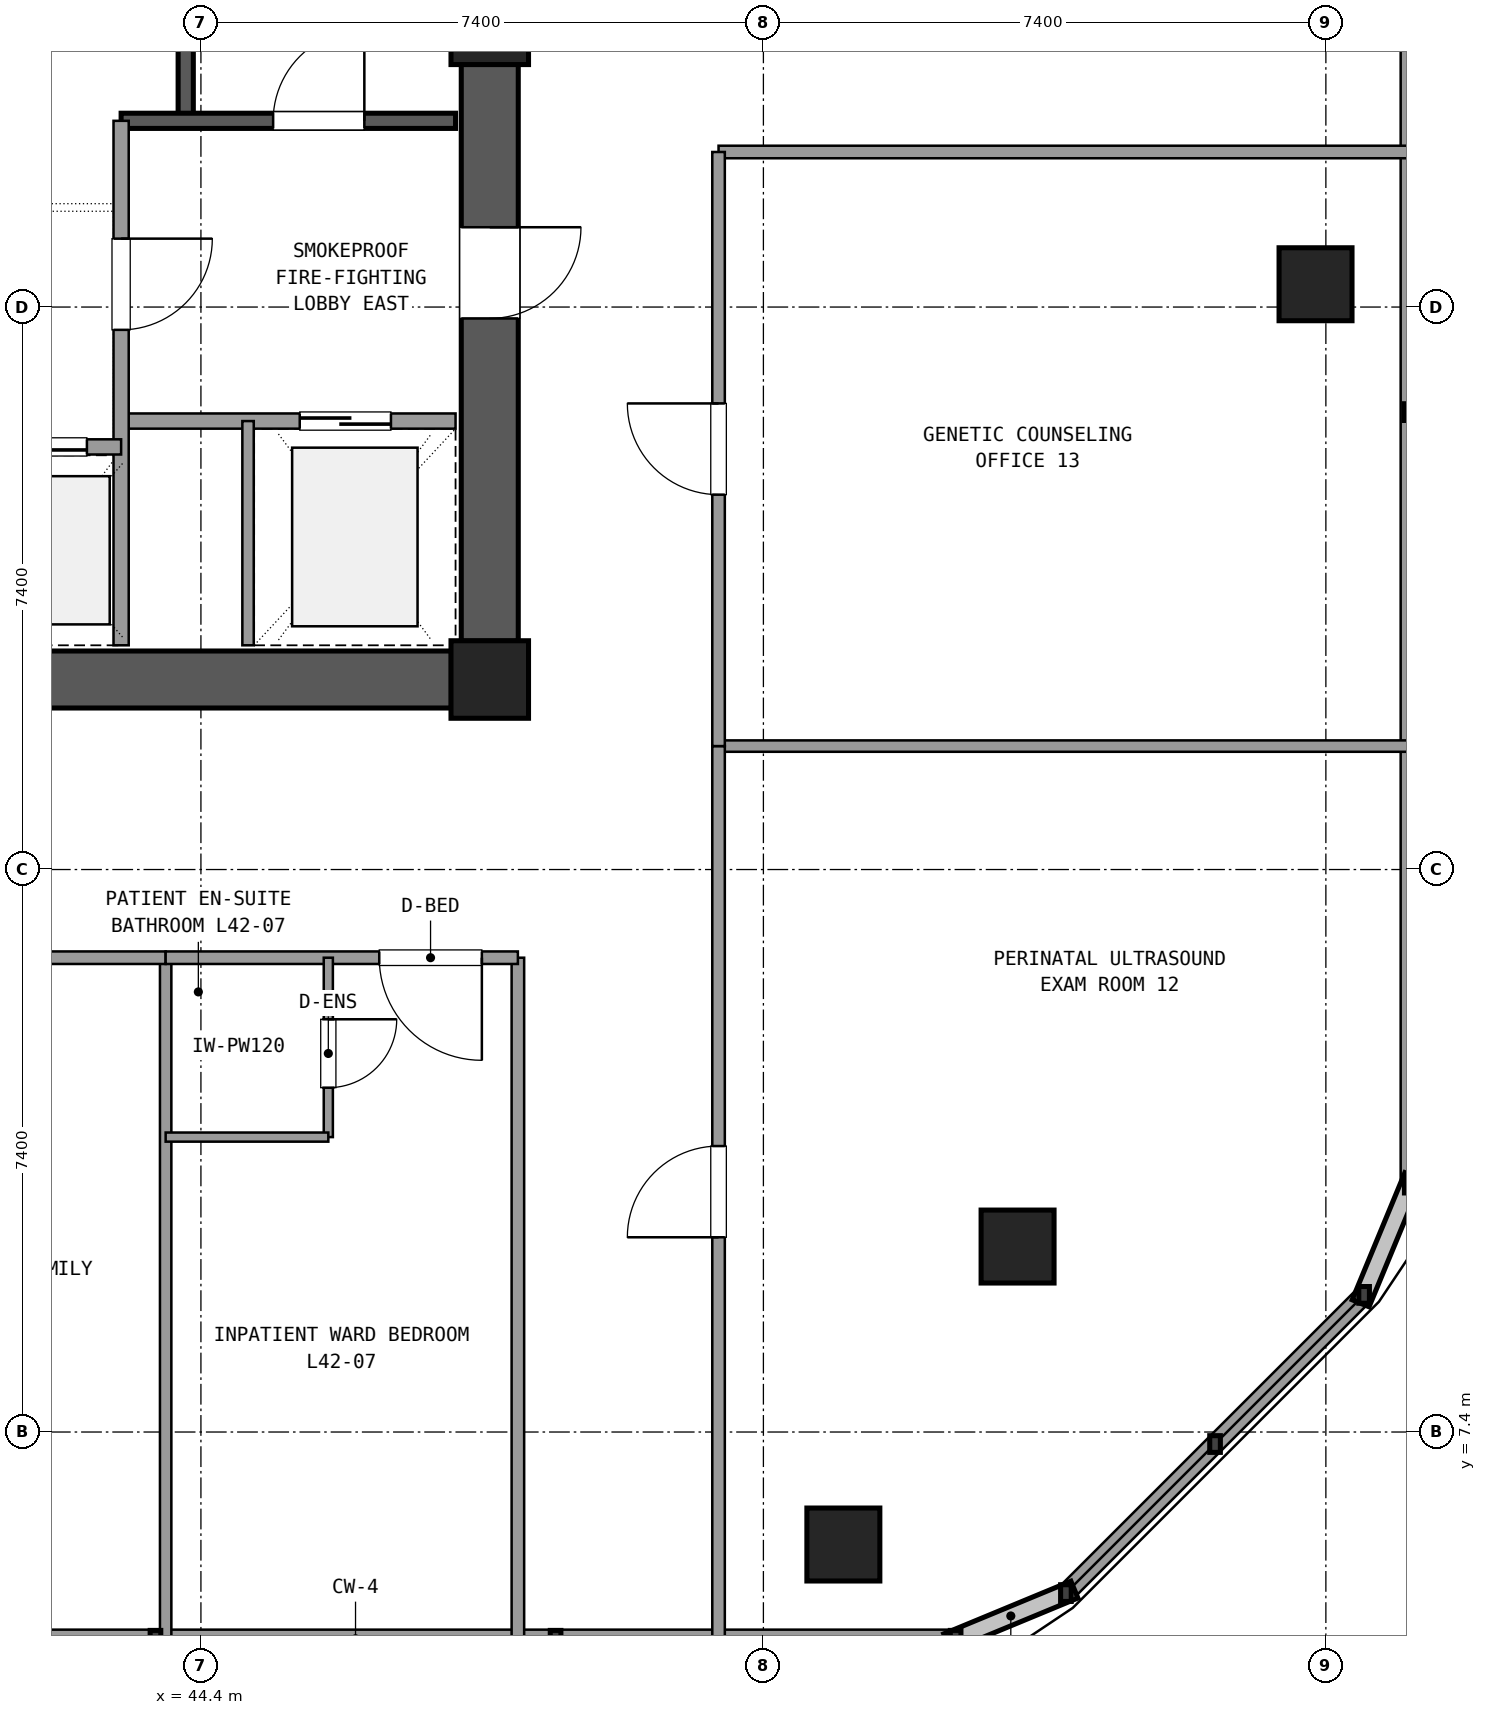
"""IFC4 building model, lengths in metres.
Left out: names, types, materials, properties, quantities, classifications, styles, units other than length and angle.
Written with IfcOpenShell. Run it as: python <this file> out.ifc"""

import sys

from ifc_helpers import new_model, si_unit, direction, frame, frame_2d, origin, origin_2d, place, context, subcontext, project, spatial, rectangle, extrude, element, fill, save


model = new_model("IFC4")
c1 = context("Model", 3, precision=1e-05, world=origin(), true_north=direction((0.0, 1.0)))
c2 = subcontext(c1, "Body", "Model", "MODEL_VIEW")
j1 = project(units=[si_unit("LENGTHUNIT", "METRE"), si_unit("PLANEANGLEUNIT", "RADIAN")], contexts=[c1])
p1 = place(None, origin())
s1 = spatial("IfcSite", under=j1, at=p1, CompositionType="ELEMENT")
p2 = place(p1, origin())
s2 = spatial("IfcBuilding", under=s1, at=p2, CompositionType="ELEMENT")
p3 = place(p2, frame((0.0, 0.0, 163.62)))
s3 = spatial("IfcBuildingStorey", under=s2, at=p3, CompositionType="ELEMENT", Elevation=163.62)
for number, where, z_axis, x_axis in (
    (1, (48.2, 17.3, 0.0), (0.0, 0.0, 1.0), (1.0, 0.0, 0.0)),
    (2, (48.2, 25.9, 0.0), (0.0, 0.0, 1.0), (1.0, 0.0, 0.0)),
):
    element("IfcColumn", number, at=place(p3, frame(where, z_axis=z_axis, x_axis=x_axis)), inside=s3, PredefinedType="COLUMN", context=c2, shape_type="SweptSolid", body=[
        extrude(rectangle(XDim=1.02, YDim=1.02, at=origin_2d()), origin(), (0.0, 0.0, 1.0), 3.6),
    ])
p4 = place(p3, frame((37.505, 17.3, 0.0), z_axis=(0.0, 0.0, 1.0), x_axis=(1.0, 0.0, 0.0)))
e3 = element("IfcWall", 3, at=p4, inside=s3, PredefinedType="SHEAR", context=c2, shape_type="SweptSolid", body=[
    extrude(rectangle(XDim=10.19, YDim=0.75, at=frame_2d((5.095, 0.0))), origin(), (0.0, 0.0, 1.0), 3.32),
])
p5 = place(p3, frame((48.2, 17.805, 0.0), z_axis=(0.0, 0.0, 1.0), x_axis=(0.0, 1.0, 0.0)))
e4 = element("IfcWall", 4, at=p5, inside=s3, PredefinedType="SHEAR", context=c2, shape_type="SweptSolid", body=[
    extrude(rectangle(XDim=7.59, YDim=0.75, at=frame_2d((3.795, 0.0))), origin(), (0.0, 0.0, 1.0), 3.32),
])
p6 = place(p5, frame((4.245, 0.0, 0.0)))
e5 = element("IfcOpeningElement", 5, at=p6, cuts=e4, PredefinedType="OPENING", context=c2, shape_type="SweptSolid", body=[
    extrude(rectangle(XDim=1.2, YDim=2.15, at=frame_2d((0.6, 1.075))), frame((0.0, 0.385, 0.0), z_axis=(0.0, -1.0, 0.0), x_axis=(1.0, 0.0, 0.0)), (0.0, 0.0, 1.0), 0.77),
])
for number, where, z_axis, x_axis in (
    (6, (52.852, 5.92, 0.0), (0.0, 0.0, 1.0), (1.0, 0.0, 0.0)),
    (7, (55.144, 9.84, 0.0), (0.0, 0.0, 1.0), (1.0, 0.0, 0.0)),
    (8, (59.064, 22.5, 0.0), (0.0, 0.0, 1.0), (1.0, 0.0, 0.0)),
):
    element("IfcColumn", number, at=place(p3, frame(where, z_axis=z_axis, x_axis=x_axis)), inside=s3, PredefinedType="COLUMN", context=c2, shape_type="SweptSolid", body=[
        extrude(rectangle(XDim=0.96, YDim=0.96, at=origin_2d()), origin(), (0.0, 0.0, 1.0), 3.6),
    ])
p7 = place(p3, frame((38.539, 4.68, 0.0), z_axis=(0.0, 0.0, 1.0), x_axis=(1.0, 0.0, 0.0)))
e9 = element("IfcWall", 9, at=p7, inside=s3, PredefinedType="SOLIDWALL", context=c2, shape_type="SweptSolid", body=[
    extrude(rectangle(XDim=15.79, YDim=0.24, at=frame_2d((7.895, 0.0))), origin(), (0.0, 0.0, 1.0), 0.85),
])
p8 = place(p3, frame((55.78, 5.281, 0.0), z_axis=(0.0, 0.0, 1.0), x_axis=(0.707084777957, 0.707128783731, 0.0)))
e10 = element("IfcWall", 10, at=p8, inside=s3, PredefinedType="SOLIDWALL", context=c2, shape_type="SweptSolid", body=[
    extrude(rectangle(XDim=5.548, YDim=0.24, at=frame_2d((2.774, 0.0))), origin(), (0.0, 0.0, 1.0), 0.85),
])
p9 = place(p3, frame((60.304, 10.655, 0.0), z_axis=(0.0, 0.0, 1.0), x_axis=(0.0, 1.0, 0.0)))
e11 = element("IfcWall", 11, at=p9, inside=s3, PredefinedType="SOLIDWALL", context=c2, shape_type="SweptSolid", body=[
    extrude(rectangle(XDim=30.49, YDim=0.24, at=frame_2d((15.245, 0.0))), origin(), (0.0, 0.0, 1.0), 0.85),
])
p10 = place(p3, frame((44.2, 24.65, 0.0), z_axis=(0.0, 0.0, 1.0), x_axis=(0.0, 1.0, 0.0)))
e12 = element("IfcWall", 12, at=p10, inside=s3, PredefinedType="SHEAR", context=c2, shape_type="SweptSolid", body=[
    extrude(rectangle(XDim=9.4, YDim=0.2, at=frame_2d((4.7, 0.0))), origin(), (0.0, 0.0, 1.0), 3.32),
])
p11 = place(p3, frame((43.35, 24.65, 0.0), z_axis=(0.0, 0.0, 1.0), x_axis=(1.0, 0.0, 0.0)))
e13 = element("IfcWall", 13, at=p11, inside=s3, PredefinedType="SHEAR", context=c2, shape_type="SweptSolid", body=[
    extrude(rectangle(XDim=4.4, YDim=0.2, at=frame_2d((2.2, 0.0))), origin(), (0.0, 0.0, 1.0), 3.32),
])
p12 = place(p11, frame((2.0, 0.0, 0.0)))
e14 = element("IfcOpeningElement", 14, at=p12, cuts=e13, PredefinedType="OPENING", context=c2, shape_type="SweptSolid", body=[
    extrude(rectangle(XDim=1.2, YDim=2.15, at=frame_2d((0.6, 1.075))), frame((0.0, 0.11, 0.0), z_axis=(0.0, -1.0, 0.0), x_axis=(1.0, 0.0, 0.0)), (0.0, 0.0, 1.0), 0.22),
])
p13 = place(p3, frame((43.35, 20.7, 0.0), z_axis=(0.0, 0.0, 1.0), x_axis=(1.0, 0.0, 0.0)))
e15 = element("IfcWall", 15, at=p13, inside=s3, PredefinedType="SOLIDWALL", context=c2, shape_type="SweptSolid", body=[
    extrude(rectangle(XDim=4.4, YDim=0.2, at=frame_2d((2.2, 0.0))), origin(), (0.0, 0.0, 1.0), 2.61),
])
p14 = place(p13, frame((2.35, 0.0, 0.0)))
e16 = element("IfcOpeningElement", 16, at=p14, cuts=e15, PredefinedType="OPENING", context=c2, shape_type="SweptSolid", body=[
    extrude(rectangle(XDim=1.2, YDim=2.15, at=frame_2d((0.6, 1.075))), frame((0.0, 0.11, 0.0), z_axis=(0.0, -1.0, 0.0), x_axis=(1.0, 0.0, 0.0)), (0.0, 0.0, 1.0), 0.22),
])
p15 = place(p3, frame((43.35, 17.75, 0.0), z_axis=(0.0, 0.0, 1.0), x_axis=(0.0, 1.0, 0.0)))
e17 = element("IfcWall", 17, at=p15, inside=s3, PredefinedType="SOLIDWALL", context=c2, shape_type="SweptSolid", body=[
    extrude(rectangle(XDim=6.9, YDim=0.2, at=frame_2d((3.45, 0.0))), origin(), (0.0, 0.0, 1.0), 2.61),
])
p16 = place(p15, frame((4.15, 0.0, 0.0)))
e18 = element("IfcOpeningElement", 18, at=p16, cuts=e17, PredefinedType="OPENING", context=c2, shape_type="SweptSolid", body=[
    extrude(rectangle(XDim=1.2, YDim=2.15, at=frame_2d((0.6, 1.075))), frame((0.0, 0.11, 0.0), z_axis=(0.0, -1.0, 0.0), x_axis=(1.0, 0.0, 0.0)), (0.0, 0.0, 1.0), 0.22),
])
p17 = place(p3, frame((45.02, 17.75, 0.0), z_axis=(0.0, 0.0, 1.0), x_axis=(0.0, 1.0, 0.0)))
e19 = element("IfcWall", 19, at=p17, inside=s3, PredefinedType="PARTITIONING", context=c2, shape_type="SweptSolid", body=[
    extrude(rectangle(XDim=2.95, YDim=0.15, at=frame_2d((1.475, 0.0))), origin(), (0.0, 0.0, 1.0), 2.61),
])
p18 = place(p3, frame((37.25, 20.36, 0.0), z_axis=(0.0, 0.0, 1.0), x_axis=(1.0, 0.0, 0.0)))
e20 = element("IfcWall", 20, at=p18, inside=s3, PredefinedType="SOLIDWALL", context=c2, shape_type="SweptSolid", body=[
    extrude(rectangle(XDim=6.1, YDim=0.2, at=frame_2d((3.05, 0.0))), origin(), (0.0, 0.0, 1.0), 2.61),
])
p19 = place(p18, frame((0.45, 0.0, 0.0)))
e21 = element("IfcOpeningElement", 21, at=p19, cuts=e20, PredefinedType="OPENING", context=c2, shape_type="SweptSolid", body=[
    extrude(rectangle(XDim=1.1, YDim=2.15, at=frame_2d((0.55, 1.075))), frame((0.0, 0.11, 0.0), z_axis=(0.0, -1.0, 0.0), x_axis=(1.0, 0.0, 0.0)), (0.0, 0.0, 1.0), 0.22),
])
p20 = place(p18, frame((2.5, 0.0, 0.0)))
e22 = element("IfcOpeningElement", 22, at=p20, cuts=e20, PredefinedType="OPENING", context=c2, shape_type="SweptSolid", body=[
    extrude(rectangle(XDim=1.1, YDim=2.15, at=frame_2d((0.55, 1.075))), frame((0.0, 0.11, 0.0), z_axis=(0.0, -1.0, 0.0), x_axis=(1.0, 0.0, 0.0)), (0.0, 0.0, 1.0), 0.22),
])
p21 = place(p18, frame((4.55, 0.0, 0.0)))
e23 = element("IfcOpeningElement", 23, at=p21, cuts=e20, PredefinedType="OPENING", context=c2, shape_type="SweptSolid", body=[
    extrude(rectangle(XDim=1.1, YDim=2.15, at=frame_2d((0.55, 1.075))), frame((0.0, 0.11, 0.0), z_axis=(0.0, -1.0, 0.0), x_axis=(1.0, 0.0, 0.0)), (0.0, 0.0, 1.0), 0.22),
])
p22 = place(p3, frame((48.57, 4.7, 0.0), z_axis=(0.0, 0.0, 1.0), x_axis=(0.0, 1.0, 0.0)))
e24 = element("IfcWall", 24, at=p22, inside=s3, PredefinedType="PARTITIONING", context=c2, shape_type="SweptSolid", body=[
    extrude(rectangle(XDim=8.94, YDim=0.165, at=frame_2d((4.47, 0.0))), origin(), (0.0, 0.0, 1.0), 2.61),
])
p23 = place(p3, frame((51.21, 24.24, 0.0), z_axis=(0.0, 0.0, 1.0), x_axis=(1.0, 0.0, 0.0)))
e25 = element("IfcWall", 25, at=p23, inside=s3, PredefinedType="PARTITIONING", context=c2, shape_type="SweptSolid", body=[
    extrude(rectangle(XDim=9.074, YDim=0.165, at=frame_2d((4.537, 0.0))), origin(), (0.0, 0.0, 1.0), 2.61),
])
p24 = place(p3, frame((43.936, 13.64, 0.0), z_axis=(0.0, 0.0, 1.0), x_axis=(0.0, -1.0, 0.0)))
e26 = element("IfcWall", 26, at=p24, inside=s3, PredefinedType="PARTITIONING", context=c2, shape_type="SweptSolid", body=[
    extrude(rectangle(XDim=8.94, YDim=0.15, at=frame_2d((4.47, 0.0))), origin(), (0.0, 0.0, 1.0), 2.61),
])
p25 = place(p3, frame((38.8, 13.64, 0.0), z_axis=(0.0, 0.0, 1.0), x_axis=(1.0, 0.0, 0.0)))
e27 = element("IfcWall", 27, at=p25, inside=s3, PredefinedType="PARTITIONING", context=c2, shape_type="SweptSolid", body=[
    extrude(rectangle(XDim=5.136, YDim=0.165, at=frame_2d((2.568, 0.0))), origin(), (0.0, 0.0, 1.0), 2.61),
])
p26 = place(p25, frame((1.968, 0.0, 0.0)))
e28 = element("IfcOpeningElement", 28, at=p26, cuts=e27, PredefinedType="OPENING", context=c2, shape_type="SweptSolid", body=[
    extrude(rectangle(XDim=1.2, YDim=2.15, at=frame_2d((0.6, 1.075))), frame((0.0, 0.093, 0.0), z_axis=(0.0, -1.0, 0.0), x_axis=(1.0, 0.0, 0.0)), (0.0, 0.0, 1.0), 0.185),
])
p27 = place(p3, frame((43.936, 13.64, 0.0), z_axis=(0.0, 0.0, 1.0), x_axis=(1.0, 0.0, 0.0)))
e29 = element("IfcWall", 29, at=p27, inside=s3, PredefinedType="PARTITIONING", context=c2, shape_type="SweptSolid", body=[
    extrude(rectangle(XDim=4.634, YDim=0.165, at=frame_2d((2.317, 0.0))), origin(), (0.0, 0.0, 1.0), 2.61),
])
p28 = place(p27, frame((2.81, 0.0, 0.0)))
e30 = element("IfcOpeningElement", 30, at=p28, cuts=e29, PredefinedType="OPENING", context=c2, shape_type="SweptSolid", body=[
    extrude(rectangle(XDim=1.35, YDim=2.15, at=frame_2d((0.675, 1.075))), frame((0.0, 0.093, 0.0), z_axis=(0.0, -1.0, 0.0), x_axis=(1.0, 0.0, 0.0)), (0.0, 0.0, 1.0), 0.185),
])
p29 = place(p3, frame((46.076, 11.28, 0.0), z_axis=(0.0, 0.0, 1.0), x_axis=(0.0, 1.0, 0.0)))
e31 = element("IfcWall", 31, at=p29, inside=s3, PredefinedType="PLUMBINGWALL", context=c2, shape_type="SweptSolid", body=[
    extrude(rectangle(XDim=2.36, YDim=0.12, at=frame_2d((1.18, 0.0))), origin(), (0.0, 0.0, 1.0), 2.61),
])
p30 = place(p29, frame((0.65, 0.0, 0.0)))
e32 = element("IfcOpeningElement", 32, at=p30, cuts=e31, PredefinedType="OPENING", context=c2, shape_type="SweptSolid", body=[
    extrude(rectangle(XDim=0.9, YDim=2.1, at=frame_2d((0.45, 1.05))), frame((0.0, 0.07, 0.0), z_axis=(0.0, -1.0, 0.0), x_axis=(1.0, 0.0, 0.0)), (0.0, 0.0, 1.0), 0.14),
])
p31 = place(p3, frame((43.936, 11.28, 0.0), z_axis=(0.0, 0.0, 1.0), x_axis=(1.0, 0.0, 0.0)))
e33 = element("IfcWall", 33, at=p31, inside=s3, PredefinedType="PLUMBINGWALL", context=c2, shape_type="SweptSolid", body=[
    extrude(rectangle(XDim=2.14, YDim=0.12, at=frame_2d((1.07, 0.0))), origin(), (0.0, 0.0, 1.0), 2.61),
])
p32 = place(p3, frame((51.21, 16.424, 0.0), z_axis=(0.0, 0.0, 1.0), x_axis=(1.0, 0.0, 0.0)))
e34 = element("IfcWall", 34, at=p32, inside=s3, PredefinedType="PARTITIONING", context=c2, shape_type="SweptSolid", body=[
    extrude(rectangle(XDim=9.074, YDim=0.15, at=frame_2d((4.537, 0.0))), origin(), (0.0, 0.0, 1.0), 2.61),
])
p33 = place(p3, frame((51.21, 4.7, 0.0), z_axis=(0.0, 0.0, 1.0), x_axis=(0.0, 1.0, 0.0)))
e35 = element("IfcWall", 35, at=p33, inside=s3, PredefinedType="PARTITIONING", context=c2, shape_type="SweptSolid", body=[
    extrude(rectangle(XDim=11.724, YDim=0.165, at=frame_2d((5.862, 0.0))), origin(), (0.0, 0.0, 1.0), 2.61),
])
p34 = place(p33, frame((5.262, 0.0, 0.0)))
e36 = element("IfcOpeningElement", 36, at=p34, cuts=e35, PredefinedType="OPENING", context=c2, shape_type="SweptSolid", body=[
    extrude(rectangle(XDim=1.2, YDim=2.15, at=frame_2d((0.6, 1.075))), frame((0.0, 0.093, 0.0), z_axis=(0.0, -1.0, 0.0), x_axis=(1.0, 0.0, 0.0)), (0.0, 0.0, 1.0), 0.185),
])
p35 = place(p3, frame((51.21, 16.424, 0.0), z_axis=(0.0, 0.0, 1.0), x_axis=(0.0, 1.0, 0.0)))
e37 = element("IfcWall", 37, at=p35, inside=s3, PredefinedType="PARTITIONING", context=c2, shape_type="SweptSolid", body=[
    extrude(rectangle(XDim=7.816, YDim=0.165, at=frame_2d((3.908, 0.0))), origin(), (0.0, 0.0, 1.0), 2.61),
])
p36 = place(p35, frame((3.308, 0.0, 0.0)))
e38 = element("IfcOpeningElement", 38, at=p36, cuts=e37, PredefinedType="OPENING", context=c2, shape_type="SweptSolid", body=[
    extrude(rectangle(XDim=1.2, YDim=2.15, at=frame_2d((0.6, 1.075))), frame((0.0, 0.093, 0.0), z_axis=(0.0, -1.0, 0.0), x_axis=(1.0, 0.0, 0.0)), (0.0, 0.0, 1.0), 0.185),
])
p37 = place(p12, origin())
e39 = element("IfcDoor", 39, at=p37, inside=s3, OperationType="SINGLE_SWING_RIGHT", PredefinedType="DOOR", context=c2, shape_type="SweptSolid", body=[
    extrude(rectangle(XDim=1.2, YDim=2.15, at=frame_2d((0.6, 1.075))), frame((0.0, 0.025, 0.0), z_axis=(0.0, -1.0, 0.0), x_axis=(1.0, 0.0, 0.0)), (0.0, 0.0, 1.0), 0.05),
])
fill(e14, e39)
p38 = place(p14, origin())
e40 = element("IfcDoor", 40, at=p38, inside=s3, OperationType="SLIDING_TO_RIGHT", PredefinedType="DOOR", context=c2, shape_type="SweptSolid", body=[
    extrude(rectangle(XDim=1.2, YDim=2.15, at=frame_2d((0.6, 1.075))), frame((0.0, 0.025, 0.0), z_axis=(0.0, -1.0, 0.0), x_axis=(1.0, 0.0, 0.0)), (0.0, 0.0, 1.0), 0.05),
])
fill(e16, e40)
p39 = place(p16, frame((1.2, 0.0, 0.0), z_axis=(0.0, 0.0, 1.0), x_axis=(-1.0, 0.0, 0.0)))
e41 = element("IfcDoor", 41, at=p39, inside=s3, OperationType="SINGLE_SWING_RIGHT", PredefinedType="DOOR", context=c2, shape_type="SweptSolid", body=[
    extrude(rectangle(XDim=1.2, YDim=2.15, at=frame_2d((0.6, 1.075))), frame((0.0, 0.025, 0.0), z_axis=(0.0, -1.0, 0.0), x_axis=(1.0, 0.0, 0.0)), (0.0, 0.0, 1.0), 0.05),
])
fill(e18, e41)
p40 = place(p6, frame((1.2, 0.0, 0.0), z_axis=(0.0, 0.0, 1.0), x_axis=(-1.0, 0.0, 0.0)))
e42 = element("IfcDoor", 42, at=p40, inside=s3, OperationType="SINGLE_SWING_RIGHT", PredefinedType="DOOR", context=c2, shape_type="SweptSolid", body=[
    extrude(rectangle(XDim=1.2, YDim=2.15, at=frame_2d((0.6, 1.075))), frame((0.0, 0.025, 0.0), z_axis=(0.0, -1.0, 0.0), x_axis=(1.0, 0.0, 0.0)), (0.0, 0.0, 1.0), 0.05),
])
fill(e5, e42)
p41 = place(p21, origin())
e43 = element("IfcDoor", 43, at=p41, inside=s3, OperationType="SLIDING_TO_LEFT", PredefinedType="DOOR", context=c2, shape_type="SweptSolid", body=[
    extrude(rectangle(XDim=1.1, YDim=2.15, at=frame_2d((0.55, 1.075))), frame((0.0, 0.025, 0.0), z_axis=(0.0, -1.0, 0.0), x_axis=(1.0, 0.0, 0.0)), (0.0, 0.0, 1.0), 0.05),
])
fill(e23, e43)
p42 = place(p30, frame((0.9, 0.0, 0.0), z_axis=(0.0, 0.0, 1.0), x_axis=(-1.0, 0.0, 0.0)))
e44 = element("IfcDoor", 44, at=p42, inside=s3, OperationType="SINGLE_SWING_RIGHT", PredefinedType="DOOR", context=c2, shape_type="SweptSolid", body=[
    extrude(rectangle(XDim=0.9, YDim=2.1, at=frame_2d((0.45, 1.05))), frame((0.0, 0.025, 0.0), z_axis=(0.0, -1.0, 0.0), x_axis=(1.0, 0.0, 0.0)), (0.0, 0.0, 1.0), 0.05),
])
fill(e32, e44)
p43 = place(p28, frame((1.35, 0.0, 0.0), z_axis=(0.0, 0.0, 1.0), x_axis=(-1.0, 0.0, 0.0)))
e45 = element("IfcDoor", 45, at=p43, inside=s3, OperationType="SINGLE_SWING_RIGHT", PredefinedType="DOOR", context=c2, shape_type="SweptSolid", body=[
    extrude(rectangle(XDim=1.35, YDim=2.15, at=frame_2d((0.675, 1.075))), frame((0.0, 0.025, 0.0), z_axis=(0.0, -1.0, 0.0), x_axis=(1.0, 0.0, 0.0)), (0.0, 0.0, 1.0), 0.05),
])
fill(e30, e45)
p44 = place(p34, origin())
e46 = element("IfcDoor", 46, at=p44, inside=s3, OperationType="SINGLE_SWING_LEFT", PredefinedType="DOOR", context=c2, shape_type="SweptSolid", body=[
    extrude(rectangle(XDim=1.2, YDim=2.15, at=frame_2d((0.6, 1.075))), frame((0.0, 0.025, 0.0), z_axis=(0.0, -1.0, 0.0), x_axis=(1.0, 0.0, 0.0)), (0.0, 0.0, 1.0), 0.05),
])
fill(e36, e46)
p45 = place(p36, origin())
e47 = element("IfcDoor", 47, at=p45, inside=s3, OperationType="SINGLE_SWING_RIGHT", PredefinedType="DOOR", context=c2, shape_type="SweptSolid", body=[
    extrude(rectangle(XDim=1.2, YDim=2.15, at=frame_2d((0.6, 1.075))), frame((0.0, 0.025, 0.0), z_axis=(0.0, -1.0, 0.0), x_axis=(1.0, 0.0, 0.0)), (0.0, 0.0, 1.0), 0.05),
])
fill(e38, e47)
save(model, sys.argv[1])
